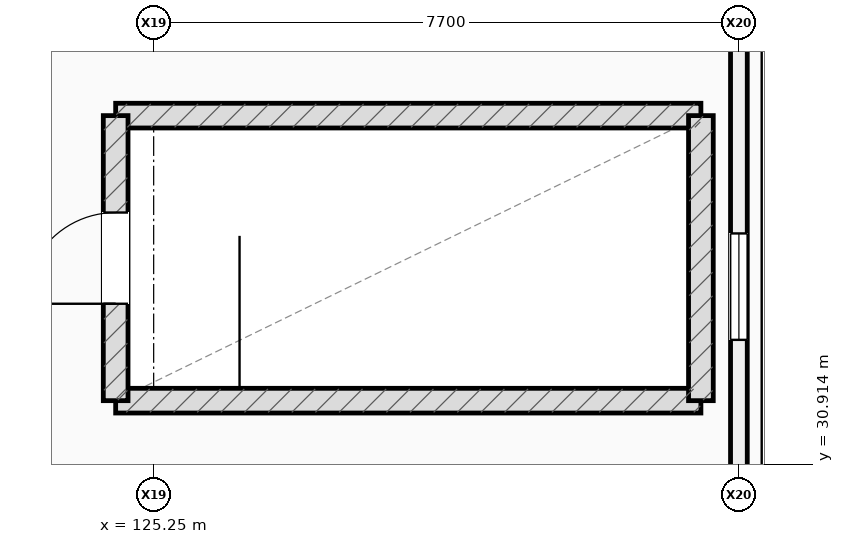
"""IFC4 building model, lengths in metres.
Left out: names, types, materials, properties, quantities, classifications, styles, units other than length and angle.
Written with IfcOpenShell. Run it as: python <this file> out.ifc"""

import sys

from ifc_helpers import new_model, si_unit, direction, frame, frame_2d, origin, place, context, subcontext, project, spatial, rectangle, extrude, element, fill, save


model = new_model("IFC4")
c1 = context("Model", 3, precision=1e-05, world=origin(), true_north=direction((0.0, 1.0)))
c2 = subcontext(c1, "Body", "Model", "MODEL_VIEW")
j1 = project(units=[si_unit("LENGTHUNIT", "METRE"), si_unit("PLANEANGLEUNIT", "RADIAN")], contexts=[c1])
p1 = place(None, origin())
s1 = spatial("IfcSite", under=j1, at=p1, CompositionType="ELEMENT")
p2 = place(p1, origin())
s2 = spatial("IfcBuilding", under=s1, at=p2, CompositionType="ELEMENT")
p3 = place(p2, frame((0.0, 0.0, 18.6)))
s3 = spatial("IfcBuildingStorey", under=s2, at=p3, CompositionType="ELEMENT", Elevation=18.6)
p4 = place(p3, frame((132.95, 36.45, 0.0), z_axis=(0.0, 0.0, 1.0), x_axis=(0.0, -1.0, 0.0)))
e1 = element("IfcWall", 1, at=p4, inside=s3, PredefinedType="STANDARD", context=c2, shape_type="SweptSolid", body=[
    extrude(rectangle(XDim=6.4, YDim=0.22, at=frame_2d((3.2, 0.0))), origin(), (0.0, 0.0, 1.0), 3.28),
])
p5 = place(p4, frame((2.5, 0.0, 1.05)))
e2 = element("IfcOpeningElement", 2, at=p5, cuts=e1, PredefinedType="OPENING", context=c2, shape_type="SweptSolid", body=[
    extrude(rectangle(XDim=1.4, YDim=1.1, at=frame_2d((0.7, 0.55))), frame((0.0, 0.12, 0.0), z_axis=(0.0, -1.0, 0.0), x_axis=(1.0, 0.0, 0.0)), (0.0, 0.0, 1.0), 0.24),
])
for number, where, z_axis, x_axis in (
    (3, (124.75, 31.75, 0.0), (0.0, 0.0, 1.0), (1.0, 0.0, 0.0)),
    (4, (132.45, 35.5, 0.0), (0.0, 0.0, 1.0), (-1.0, 0.0, 0.0)),
):
    element("IfcWall", number, at=place(p3, frame(where, z_axis=z_axis, x_axis=x_axis)), inside=s3, PredefinedType="SHEAR", context=c2, shape_type="SweptSolid", body=[
        extrude(rectangle(XDim=7.7, YDim=0.325, at=frame_2d((3.85, 0.0))), origin(), (0.0, 0.0, 1.0), 3.99),
    ])
p6 = place(p3, frame((124.75, 35.5, 0.0), z_axis=(0.0, 0.0, 1.0), x_axis=(0.0, -1.0, 0.0)))
e5 = element("IfcWall", 5, at=p6, inside=s3, PredefinedType="SHEAR", context=c2, shape_type="SweptSolid", body=[
    extrude(rectangle(XDim=3.75, YDim=0.325, at=frame_2d((1.875, 0.0))), origin(), (0.0, 0.0, 1.0), 3.99),
])
p7 = place(p6, frame((1.275, 0.0, 0.0)))
e6 = element("IfcOpeningElement", 6, at=p7, cuts=e5, PredefinedType="OPENING", context=c2, shape_type="SweptSolid", body=[
    extrude(rectangle(XDim=1.2, YDim=2.2, at=frame_2d((0.6, 1.1))), frame((0.0, 0.172, 0.0), z_axis=(0.0, -1.0, 0.0), x_axis=(1.0, 0.0, 0.0)), (0.0, 0.0, 1.0), 0.345),
])
p8 = place(p3, frame((132.45, 31.75, 0.0), z_axis=(0.0, 0.0, 1.0), x_axis=(0.0, 1.0, 0.0)))
e7 = element("IfcWall", 7, at=p8, inside=s3, PredefinedType="SHEAR", context=c2, shape_type="SweptSolid", body=[
    extrude(rectangle(XDim=3.75, YDim=0.325, at=frame_2d((1.875, 0.0))), origin(), (0.0, 0.0, 1.0), 3.99),
])
p9 = place(p5, origin())
e8 = element("IfcWindow", 8, at=p9, inside=s3, PartitioningType="SINGLE_PANEL", PredefinedType="WINDOW", context=c2, shape_type="SweptSolid", body=[
    extrude(rectangle(XDim=1.4, YDim=1.1, at=frame_2d((0.7, 0.55))), frame((0.0, 0.03, 0.0), z_axis=(0.0, -1.0, 0.0), x_axis=(1.0, 0.0, 0.0)), (0.0, 0.0, 1.0), 0.06),
])
fill(e2, e8)
p10 = place(p7, origin())
e9 = element("IfcDoor", 9, at=p10, inside=s3, OperationType="SINGLE_SWING_RIGHT", PredefinedType="DOOR", context=c2, shape_type="SweptSolid", body=[
    extrude(rectangle(XDim=1.2, YDim=2.2, at=frame_2d((0.6, 1.1))), frame((0.0, 0.025, 0.0), z_axis=(0.0, -1.0, 0.0), x_axis=(1.0, 0.0, 0.0)), (0.0, 0.0, 1.0), 0.05),
])
fill(e6, e9)
save(model, sys.argv[1])
